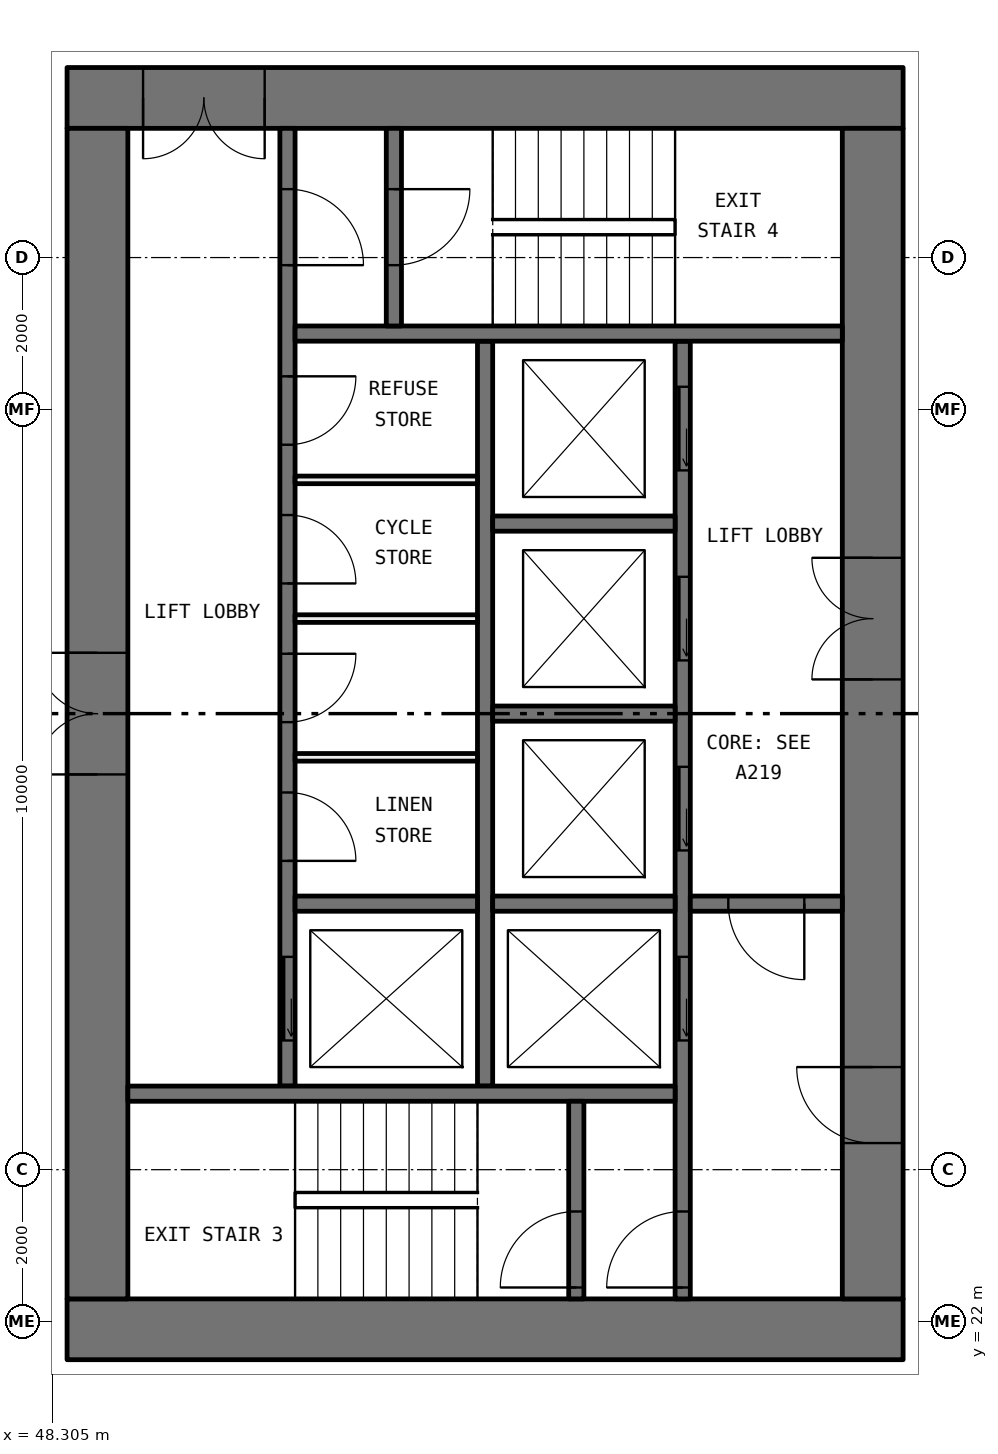
"""IFC4 building model, lengths in metres.
Left out: names, types, materials, properties, quantities, classifications, styles, units other than length and angle.
Written with IfcOpenShell. Run it as: python <this file> out.ifc"""

import sys

from ifc_helpers import new_model, si_unit, direction, frame, frame_2d, origin, place, context, subcontext, project, spatial, rectangle, extrude, element, fill, save


model = new_model("IFC4")
c1 = context("Model", 3, precision=1e-05, world=origin(), true_north=direction((0.0, 1.0)))
c2 = subcontext(c1, "Body", "Model", "MODEL_VIEW")
j1 = project(units=[si_unit("LENGTHUNIT", "METRE"), si_unit("PLANEANGLEUNIT", "RADIAN")], contexts=[c1])
p1 = place(None, origin())
s1 = spatial("IfcSite", under=j1, at=p1, CompositionType="ELEMENT")
p2 = place(p1, origin())
s2 = spatial("IfcBuilding", under=s1, at=p2, CompositionType="ELEMENT")
p3 = place(p2, frame((0.0, 0.0, 74.85)))
s3 = spatial("IfcBuildingStorey", under=s2, at=p3, CompositionType="ELEMENT", Elevation=74.85)
p4 = place(p3, frame((59.5, 21.9, 0.0), z_axis=(0.0, 0.0, 1.0), x_axis=(-1.0, 0.0, 0.0)))
e1 = element("IfcWall", 1, at=p4, inside=s3, PredefinedType="SHEAR", context=c2, shape_type="SweptSolid", body=[
    extrude(rectangle(XDim=11.0, YDim=0.8, at=frame_2d((5.5, 0.0))), origin(), (0.0, 0.0, 1.0), 3.05),
])
p5 = place(p3, frame((59.5, 38.1, 0.0), z_axis=(0.0, 0.0, 1.0), x_axis=(-1.0, 0.0, 0.0)))
e2 = element("IfcWall", 2, at=p5, inside=s3, PredefinedType="SHEAR", context=c2, shape_type="SweptSolid", body=[
    extrude(rectangle(XDim=11.0, YDim=0.8, at=frame_2d((5.5, 0.0))), origin(), (0.0, 0.0, 1.0), 3.05),
])
p6 = place(p5, frame((8.4, 0.0, 0.0)))
e3 = element("IfcOpeningElement", 3, at=p6, cuts=e2, PredefinedType="OPENING", context=c2, shape_type="SweptSolid", body=[
    extrude(rectangle(XDim=1.6, YDim=2.1, at=frame_2d((0.8, 1.05))), frame((0.0, 0.41, 0.0), z_axis=(0.0, -1.0, 0.0), x_axis=(1.0, 0.0, 0.0)), (0.0, 0.0, 1.0), 0.82),
])
p7 = place(p3, frame((59.1, 22.3, 0.0), z_axis=(0.0, 0.0, 1.0), x_axis=(0.0, 1.0, 0.0)))
e4 = element("IfcWall", 4, at=p7, inside=s3, PredefinedType="SHEAR", context=c2, shape_type="SweptSolid", body=[
    extrude(rectangle(XDim=15.4, YDim=0.8, at=frame_2d((7.7, 0.0))), origin(), (0.0, 0.0, 1.0), 3.05),
])
p8 = place(p7, frame((8.15, 0.0, 0.0)))
e5 = element("IfcOpeningElement", 5, at=p8, cuts=e4, PredefinedType="OPENING", context=c2, shape_type="SweptSolid", body=[
    extrude(rectangle(XDim=1.6, YDim=2.1, at=frame_2d((0.8, 1.05))), frame((0.0, 0.41, 0.0), z_axis=(0.0, -1.0, 0.0), x_axis=(1.0, 0.0, 0.0)), (0.0, 0.0, 1.0), 0.82),
])
p9 = place(p7, frame((2.05, 0.0, 0.0)))
e6 = element("IfcOpeningElement", 6, at=p9, cuts=e4, PredefinedType="OPENING", context=c2, shape_type="SweptSolid", body=[
    extrude(rectangle(XDim=1.0, YDim=2.1, at=frame_2d((0.5, 1.05))), frame((0.0, 0.41, 0.0), z_axis=(0.0, -1.0, 0.0), x_axis=(1.0, 0.0, 0.0)), (0.0, 0.0, 1.0), 0.82),
])
p10 = place(p3, frame((48.9, 22.3, 0.0), z_axis=(0.0, 0.0, 1.0), x_axis=(0.0, 1.0, 0.0)))
e7 = element("IfcWall", 7, at=p10, inside=s3, PredefinedType="SHEAR", context=c2, shape_type="SweptSolid", body=[
    extrude(rectangle(XDim=15.4, YDim=0.8, at=frame_2d((7.7, 0.0))), origin(), (0.0, 0.0, 1.0), 3.05),
])
p11 = place(p10, frame((6.9, 0.0, 0.0)))
e8 = element("IfcOpeningElement", 8, at=p11, cuts=e7, PredefinedType="OPENING", context=c2, shape_type="SweptSolid", body=[
    extrude(rectangle(XDim=1.6, YDim=2.1, at=frame_2d((0.8, 1.05))), frame((0.0, 0.41, 0.0), z_axis=(0.0, -1.0, 0.0), x_axis=(1.0, 0.0, 0.0)), (0.0, 0.0, 1.0), 0.82),
])
p12 = place(p3, frame((56.6, 22.3, 0.0), z_axis=(0.0, 0.0, 1.0), x_axis=(0.0, 1.0, 0.0)))
e9 = element("IfcWall", 9, at=p12, inside=s3, PredefinedType="SOLIDWALL", context=c2, shape_type="SweptSolid", body=[
    extrude(rectangle(XDim=12.6, YDim=0.2, at=frame_2d((6.3, 0.0))), origin(), (0.0, 0.0, 1.0), 3.05),
])
p13 = place(p12, frame((3.4, 0.0, 0.0)))
e10 = element("IfcOpeningElement", 10, at=p13, cuts=e9, PredefinedType="OPENING", context=c2, shape_type="SweptSolid", body=[
    extrude(rectangle(XDim=1.1, YDim=2.1, at=frame_2d((0.55, 1.05))), frame((0.0, 0.11, 0.0), z_axis=(0.0, -1.0, 0.0), x_axis=(1.0, 0.0, 0.0)), (0.0, 0.0, 1.0), 0.22),
])
p14 = place(p12, frame((5.9, 0.0, 0.0)))
e11 = element("IfcOpeningElement", 11, at=p14, cuts=e9, PredefinedType="OPENING", context=c2, shape_type="SweptSolid", body=[
    extrude(rectangle(XDim=1.1, YDim=2.1, at=frame_2d((0.55, 1.05))), frame((0.0, 0.11, 0.0), z_axis=(0.0, -1.0, 0.0), x_axis=(1.0, 0.0, 0.0)), (0.0, 0.0, 1.0), 0.22),
])
p15 = place(p12, frame((8.4, 0.0, 0.0)))
e12 = element("IfcOpeningElement", 12, at=p15, cuts=e9, PredefinedType="OPENING", context=c2, shape_type="SweptSolid", body=[
    extrude(rectangle(XDim=1.1, YDim=2.1, at=frame_2d((0.55, 1.05))), frame((0.0, 0.11, 0.0), z_axis=(0.0, -1.0, 0.0), x_axis=(1.0, 0.0, 0.0)), (0.0, 0.0, 1.0), 0.22),
])
p16 = place(p12, frame((10.9, 0.0, 0.0)))
e13 = element("IfcOpeningElement", 13, at=p16, cuts=e9, PredefinedType="OPENING", context=c2, shape_type="SweptSolid", body=[
    extrude(rectangle(XDim=1.1, YDim=2.1, at=frame_2d((0.55, 1.05))), frame((0.0, 0.11, 0.0), z_axis=(0.0, -1.0, 0.0), x_axis=(1.0, 0.0, 0.0)), (0.0, 0.0, 1.0), 0.22),
])
p17 = place(p12, frame((0.15, 0.0, 0.0)))
e14 = element("IfcOpeningElement", 14, at=p17, cuts=e9, PredefinedType="OPENING", context=c2, shape_type="SweptSolid", body=[
    extrude(rectangle(XDim=1.0, YDim=2.1, at=frame_2d((0.5, 1.05))), frame((0.0, 0.11, 0.0), z_axis=(0.0, -1.0, 0.0), x_axis=(1.0, 0.0, 0.0)), (0.0, 0.0, 1.0), 0.22),
])
p18 = place(p3, frame((51.4, 25.1, 0.0), z_axis=(0.0, 0.0, 1.0), x_axis=(0.0, 1.0, 0.0)))
e15 = element("IfcWall", 15, at=p18, inside=s3, PredefinedType="SOLIDWALL", context=c2, shape_type="SweptSolid", body=[
    extrude(rectangle(XDim=12.6, YDim=0.2, at=frame_2d((6.3, 0.0))), origin(), (0.0, 0.0, 1.0), 3.05),
])
p19 = place(p18, frame((0.6, 0.0, 0.0)))
e16 = element("IfcOpeningElement", 16, at=p19, cuts=e15, PredefinedType="OPENING", context=c2, shape_type="SweptSolid", body=[
    extrude(rectangle(XDim=1.1, YDim=2.1, at=frame_2d((0.55, 1.05))), frame((0.0, 0.11, 0.0), z_axis=(0.0, -1.0, 0.0), x_axis=(1.0, 0.0, 0.0)), (0.0, 0.0, 1.0), 0.22),
])
p20 = place(p18, frame((10.8, 0.0, 0.0)))
e17 = element("IfcOpeningElement", 17, at=p20, cuts=e15, PredefinedType="OPENING", context=c2, shape_type="SweptSolid", body=[
    extrude(rectangle(XDim=1.0, YDim=2.1, at=frame_2d((0.5, 1.05))), frame((0.0, 0.11, 0.0), z_axis=(0.0, -1.0, 0.0), x_axis=(1.0, 0.0, 0.0)), (0.0, 0.0, 1.0), 0.22),
])
p21 = place(p18, frame((2.962, 0.0, 0.0)))
e18 = element("IfcOpeningElement", 18, at=p21, cuts=e15, PredefinedType="OPENING", context=c2, shape_type="SweptSolid", body=[
    extrude(rectangle(XDim=0.9, YDim=2.1, at=frame_2d((0.45, 1.05))), frame((0.0, 0.11, 0.0), z_axis=(0.0, -1.0, 0.0), x_axis=(1.0, 0.0, 0.0)), (0.0, 0.0, 1.0), 0.22),
])
p22 = place(p18, frame((4.788, 0.0, 0.0)))
e19 = element("IfcOpeningElement", 19, at=p22, cuts=e15, PredefinedType="OPENING", context=c2, shape_type="SweptSolid", body=[
    extrude(rectangle(XDim=0.9, YDim=2.1, at=frame_2d((0.45, 1.05))), frame((0.0, 0.11, 0.0), z_axis=(0.0, -1.0, 0.0), x_axis=(1.0, 0.0, 0.0)), (0.0, 0.0, 1.0), 0.22),
])
p23 = place(p18, frame((6.613, 0.0, 0.0)))
e20 = element("IfcOpeningElement", 20, at=p23, cuts=e15, PredefinedType="OPENING", context=c2, shape_type="SweptSolid", body=[
    extrude(rectangle(XDim=0.9, YDim=2.1, at=frame_2d((0.45, 1.05))), frame((0.0, 0.11, 0.0), z_axis=(0.0, -1.0, 0.0), x_axis=(1.0, 0.0, 0.0)), (0.0, 0.0, 1.0), 0.22),
])
p24 = place(p18, frame((8.438, 0.0, 0.0)))
e21 = element("IfcOpeningElement", 21, at=p24, cuts=e15, PredefinedType="OPENING", context=c2, shape_type="SweptSolid", body=[
    extrude(rectangle(XDim=0.9, YDim=2.1, at=frame_2d((0.45, 1.05))), frame((0.0, 0.11, 0.0), z_axis=(0.0, -1.0, 0.0), x_axis=(1.0, 0.0, 0.0)), (0.0, 0.0, 1.0), 0.22),
])
p25 = place(p3, frame((54.0, 25.1, 0.0), z_axis=(0.0, 0.0, 1.0), x_axis=(0.0, 1.0, 0.0)))
e22 = element("IfcWall", 22, at=p25, inside=s3, PredefinedType="SOLIDWALL", context=c2, shape_type="SweptSolid", body=[
    extrude(rectangle(XDim=9.8, YDim=0.2, at=frame_2d((4.9, 0.0))), origin(), (0.0, 0.0, 1.0), 3.05),
])
for number, where, z_axis, x_axis in (
    (23, (56.5, 25.0, 0.0), (0.0, 0.0, 1.0), (-1.0, 0.0, 0.0)),
    (24, (58.7, 35.0, 0.0), (0.0, 0.0, 1.0), (-1.0, 0.0, 0.0)),
):
    element("IfcWall", number, at=place(p3, frame(where, z_axis=z_axis, x_axis=x_axis)), inside=s3, PredefinedType="SOLIDWALL", context=c2, shape_type="SweptSolid", body=[
        extrude(rectangle(XDim=7.2, YDim=0.2, at=frame_2d((3.6, 0.0))), origin(), (0.0, 0.0, 1.0), 3.05),
    ])
p26 = place(p3, frame((58.7, 27.5, 0.0), z_axis=(0.0, 0.0, 1.0), x_axis=(-1.0, 0.0, 0.0)))
e25 = element("IfcWall", 25, at=p26, inside=s3, PredefinedType="SOLIDWALL", context=c2, shape_type="SweptSolid", body=[
    extrude(rectangle(XDim=2.0, YDim=0.2, at=frame_2d((1.0, 0.0))), origin(), (0.0, 0.0, 1.0), 3.05),
])
p27 = place(p26, frame((0.5, 0.0, 0.0)))
e26 = element("IfcOpeningElement", 26, at=p27, cuts=e25, PredefinedType="OPENING", context=c2, shape_type="SweptSolid", body=[
    extrude(rectangle(XDim=1.0, YDim=2.1, at=frame_2d((0.5, 1.05))), frame((0.0, 0.11, 0.0), z_axis=(0.0, -1.0, 0.0), x_axis=(1.0, 0.0, 0.0)), (0.0, 0.0, 1.0), 0.22),
])
p28 = place(p3, frame((55.2, 22.3, 0.0), z_axis=(0.0, 0.0, 1.0), x_axis=(0.0, 1.0, 0.0)))
e27 = element("IfcWall", 27, at=p28, inside=s3, PredefinedType="SOLIDWALL", context=c2, shape_type="SweptSolid", body=[
    extrude(rectangle(XDim=2.6, YDim=0.2, at=frame_2d((1.3, 0.0))), origin(), (0.0, 0.0, 1.0), 3.05),
])
p29 = place(p28, frame((0.15, 0.0, 0.0)))
e28 = element("IfcOpeningElement", 28, at=p29, cuts=e27, PredefinedType="OPENING", context=c2, shape_type="SweptSolid", body=[
    extrude(rectangle(XDim=1.0, YDim=2.1, at=frame_2d((0.5, 1.05))), frame((0.0, 0.11, 0.0), z_axis=(0.0, -1.0, 0.0), x_axis=(1.0, 0.0, 0.0)), (0.0, 0.0, 1.0), 0.22),
])
p30 = place(p3, frame((52.8, 35.1, 0.0), z_axis=(0.0, 0.0, 1.0), x_axis=(0.0, 1.0, 0.0)))
e29 = element("IfcWall", 29, at=p30, inside=s3, PredefinedType="SOLIDWALL", context=c2, shape_type="SweptSolid", body=[
    extrude(rectangle(XDim=2.6, YDim=0.2, at=frame_2d((1.3, 0.0))), origin(), (0.0, 0.0, 1.0), 3.05),
])
p31 = place(p30, frame((0.8, 0.0, 0.0)))
e30 = element("IfcOpeningElement", 30, at=p31, cuts=e29, PredefinedType="OPENING", context=c2, shape_type="SweptSolid", body=[
    extrude(rectangle(XDim=1.0, YDim=2.1, at=frame_2d((0.5, 1.05))), frame((0.0, 0.11, 0.0), z_axis=(0.0, -1.0, 0.0), x_axis=(1.0, 0.0, 0.0)), (0.0, 0.0, 1.0), 0.22),
])
for number, where, z_axis, x_axis in (
    (31, (56.5, 27.5, 0.0), (0.0, 0.0, 1.0), (-1.0, 0.0, 0.0)),
    (32, (56.5, 30.0, 0.0), (0.0, 0.0, 1.0), (-1.0, 0.0, 0.0)),
    (33, (56.5, 32.5, 0.0), (0.0, 0.0, 1.0), (-1.0, 0.0, 0.0)),
    (34, (53.9, 27.5, 0.0), (0.0, 0.0, 1.0), (-1.0, 0.0, 0.0)),
):
    element("IfcWall", number, at=place(p3, frame(where, z_axis=z_axis, x_axis=x_axis)), inside=s3, PredefinedType="SOLIDWALL", context=c2, shape_type="SweptSolid", body=[
        extrude(rectangle(XDim=2.4, YDim=0.2, at=frame_2d((1.2, 0.0))), origin(), (0.0, 0.0, 1.0), 3.05),
    ])
for number, where, z_axis, x_axis in (
    (35, (53.9, 29.425, 0.0), (0.0, 0.0, 1.0), (-1.0, 0.0, 0.0)),
    (36, (53.9, 31.25, 0.0), (0.0, 0.0, 1.0), (-1.0, 0.0, 0.0)),
    (37, (53.9, 33.075, 0.0), (0.0, 0.0, 1.0), (-1.0, 0.0, 0.0)),
):
    element("IfcWall", number, at=place(p3, frame(where, z_axis=z_axis, x_axis=x_axis)), inside=s3, PredefinedType="PARTITIONING", context=c2, shape_type="SweptSolid", body=[
        extrude(rectangle(XDim=2.4, YDim=0.1, at=frame_2d((1.2, 0.0))), origin(), (0.0, 0.0, 1.0), 3.05),
    ])
p32 = place(p19, origin())
e38 = element("IfcDoor", 38, at=p32, inside=s3, OperationType="SLIDING_TO_LEFT", PredefinedType="DOOR", context=c2, shape_type="SweptSolid", body=[
    extrude(rectangle(XDim=1.1, YDim=2.1, at=frame_2d((0.55, 1.05))), frame((0.0, 0.025, 0.0), z_axis=(0.0, -1.0, 0.0), x_axis=(1.0, 0.0, 0.0)), (0.0, 0.0, 1.0), 0.05),
])
fill(e16, e38)
p33 = place(p13, origin())
e39 = element("IfcDoor", 39, at=p33, inside=s3, OperationType="SLIDING_TO_LEFT", PredefinedType="DOOR", context=c2, shape_type="SweptSolid", body=[
    extrude(rectangle(XDim=1.1, YDim=2.1, at=frame_2d((0.55, 1.05))), frame((0.0, 0.025, 0.0), z_axis=(0.0, -1.0, 0.0), x_axis=(1.0, 0.0, 0.0)), (0.0, 0.0, 1.0), 0.05),
])
fill(e10, e39)
p34 = place(p14, origin())
e40 = element("IfcDoor", 40, at=p34, inside=s3, OperationType="SLIDING_TO_LEFT", PredefinedType="DOOR", context=c2, shape_type="SweptSolid", body=[
    extrude(rectangle(XDim=1.1, YDim=2.1, at=frame_2d((0.55, 1.05))), frame((0.0, 0.025, 0.0), z_axis=(0.0, -1.0, 0.0), x_axis=(1.0, 0.0, 0.0)), (0.0, 0.0, 1.0), 0.05),
])
fill(e11, e40)
p35 = place(p15, origin())
e41 = element("IfcDoor", 41, at=p35, inside=s3, OperationType="SLIDING_TO_LEFT", PredefinedType="DOOR", context=c2, shape_type="SweptSolid", body=[
    extrude(rectangle(XDim=1.1, YDim=2.1, at=frame_2d((0.55, 1.05))), frame((0.0, 0.025, 0.0), z_axis=(0.0, -1.0, 0.0), x_axis=(1.0, 0.0, 0.0)), (0.0, 0.0, 1.0), 0.05),
])
fill(e12, e41)
p36 = place(p16, origin())
e42 = element("IfcDoor", 42, at=p36, inside=s3, OperationType="SLIDING_TO_LEFT", PredefinedType="DOOR", context=c2, shape_type="SweptSolid", body=[
    extrude(rectangle(XDim=1.1, YDim=2.1, at=frame_2d((0.55, 1.05))), frame((0.0, 0.025, 0.0), z_axis=(0.0, -1.0, 0.0), x_axis=(1.0, 0.0, 0.0)), (0.0, 0.0, 1.0), 0.05),
])
fill(e13, e42)
p37 = place(p29, origin())
e43 = element("IfcDoor", 43, at=p37, inside=s3, OperationType="SINGLE_SWING_RIGHT", PredefinedType="DOOR", context=c2, shape_type="SweptSolid", body=[
    extrude(rectangle(XDim=1.0, YDim=2.1, at=frame_2d((0.5, 1.05))), frame((0.0, 0.025, 0.0), z_axis=(0.0, -1.0, 0.0), x_axis=(1.0, 0.0, 0.0)), (0.0, 0.0, 1.0), 0.05),
])
fill(e28, e43)
p38 = place(p17, origin())
e44 = element("IfcDoor", 44, at=p38, inside=s3, OperationType="SINGLE_SWING_RIGHT", PredefinedType="DOOR", context=c2, shape_type="SweptSolid", body=[
    extrude(rectangle(XDim=1.0, YDim=2.1, at=frame_2d((0.5, 1.05))), frame((0.0, 0.025, 0.0), z_axis=(0.0, -1.0, 0.0), x_axis=(1.0, 0.0, 0.0)), (0.0, 0.0, 1.0), 0.05),
])
fill(e14, e44)
p39 = place(p20, frame((1.0, 0.0, 0.0), x_axis=(-1.0, 0.0, 0.0)))
e45 = element("IfcDoor", 45, at=p39, inside=s3, OperationType="SINGLE_SWING_LEFT", PredefinedType="DOOR", context=c2, shape_type="SweptSolid", body=[
    extrude(rectangle(XDim=1.0, YDim=2.1, at=frame_2d((0.5, 1.05))), frame((0.0, 0.025, 0.0), z_axis=(0.0, -1.0, 0.0), x_axis=(1.0, 0.0, 0.0)), (0.0, 0.0, 1.0), 0.05),
])
fill(e17, e45)
p40 = place(p31, frame((1.0, 0.0, 0.0), x_axis=(-1.0, 0.0, 0.0)))
e46 = element("IfcDoor", 46, at=p40, inside=s3, OperationType="SINGLE_SWING_RIGHT", PredefinedType="DOOR", context=c2, shape_type="SweptSolid", body=[
    extrude(rectangle(XDim=1.0, YDim=2.1, at=frame_2d((0.5, 1.05))), frame((0.0, 0.025, 0.0), z_axis=(0.0, -1.0, 0.0), x_axis=(1.0, 0.0, 0.0)), (0.0, 0.0, 1.0), 0.05),
])
fill(e30, e46)
p41 = place(p27, origin())
e47 = element("IfcDoor", 47, at=p41, inside=s3, OperationType="SINGLE_SWING_RIGHT", PredefinedType="DOOR", context=c2, shape_type="SweptSolid", body=[
    extrude(rectangle(XDim=1.0, YDim=2.1, at=frame_2d((0.5, 1.05))), frame((0.0, 0.025, 0.0), z_axis=(0.0, -1.0, 0.0), x_axis=(1.0, 0.0, 0.0)), (0.0, 0.0, 1.0), 0.05),
])
fill(e26, e47)
p42 = place(p8, origin())
e48 = element("IfcDoor", 48, at=p42, inside=s3, OperationType="DOUBLE_DOOR_SINGLE_SWING", PredefinedType="DOOR", context=c2, shape_type="SweptSolid", body=[
    extrude(rectangle(XDim=1.6, YDim=2.1, at=frame_2d((0.8, 1.05))), frame((0.0, 0.025, 0.0), z_axis=(0.0, -1.0, 0.0), x_axis=(1.0, 0.0, 0.0)), (0.0, 0.0, 1.0), 0.05),
])
fill(e5, e48)
p43 = place(p9, origin())
e49 = element("IfcDoor", 49, at=p43, inside=s3, OperationType="SINGLE_SWING_LEFT", PredefinedType="DOOR", context=c2, shape_type="SweptSolid", body=[
    extrude(rectangle(XDim=1.0, YDim=2.1, at=frame_2d((0.5, 1.05))), frame((0.0, 0.025, 0.0), z_axis=(0.0, -1.0, 0.0), x_axis=(1.0, 0.0, 0.0)), (0.0, 0.0, 1.0), 0.05),
])
fill(e6, e49)
p44 = place(p6, origin())
e50 = element("IfcDoor", 50, at=p44, inside=s3, OperationType="DOUBLE_DOOR_SINGLE_SWING", PredefinedType="DOOR", context=c2, shape_type="SweptSolid", body=[
    extrude(rectangle(XDim=1.6, YDim=2.1, at=frame_2d((0.8, 1.05))), frame((0.0, 0.025, 0.0), z_axis=(0.0, -1.0, 0.0), x_axis=(1.0, 0.0, 0.0)), (0.0, 0.0, 1.0), 0.05),
])
fill(e3, e50)
p45 = place(p11, origin())
e51 = element("IfcDoor", 51, at=p45, inside=s3, OperationType="DOUBLE_DOOR_SINGLE_SWING", PredefinedType="DOOR", context=c2, shape_type="SweptSolid", body=[
    extrude(rectangle(XDim=1.6, YDim=2.1, at=frame_2d((0.8, 1.05))), frame((0.0, 0.025, 0.0), z_axis=(0.0, -1.0, 0.0), x_axis=(1.0, 0.0, 0.0)), (0.0, 0.0, 1.0), 0.05),
])
fill(e8, e51)
p46 = place(p21, frame((0.9, 0.0, 0.0), x_axis=(-1.0, 0.0, 0.0)))
e52 = element("IfcDoor", 52, at=p46, inside=s3, OperationType="SINGLE_SWING_LEFT", PredefinedType="DOOR", context=c2, shape_type="SweptSolid", body=[
    extrude(rectangle(XDim=0.9, YDim=2.1, at=frame_2d((0.45, 1.05))), frame((0.0, 0.025, 0.0), z_axis=(0.0, -1.0, 0.0), x_axis=(1.0, 0.0, 0.0)), (0.0, 0.0, 1.0), 0.05),
])
fill(e18, e52)
p47 = place(p22, frame((0.9, 0.0, 0.0), x_axis=(-1.0, 0.0, 0.0)))
e53 = element("IfcDoor", 53, at=p47, inside=s3, OperationType="SINGLE_SWING_RIGHT", PredefinedType="DOOR", context=c2, shape_type="SweptSolid", body=[
    extrude(rectangle(XDim=0.9, YDim=2.1, at=frame_2d((0.45, 1.05))), frame((0.0, 0.025, 0.0), z_axis=(0.0, -1.0, 0.0), x_axis=(1.0, 0.0, 0.0)), (0.0, 0.0, 1.0), 0.05),
])
fill(e19, e53)
p48 = place(p23, frame((0.9, 0.0, 0.0), x_axis=(-1.0, 0.0, 0.0)))
e54 = element("IfcDoor", 54, at=p48, inside=s3, OperationType="SINGLE_SWING_LEFT", PredefinedType="DOOR", context=c2, shape_type="SweptSolid", body=[
    extrude(rectangle(XDim=0.9, YDim=2.1, at=frame_2d((0.45, 1.05))), frame((0.0, 0.025, 0.0), z_axis=(0.0, -1.0, 0.0), x_axis=(1.0, 0.0, 0.0)), (0.0, 0.0, 1.0), 0.05),
])
fill(e20, e54)
p49 = place(p24, frame((0.9, 0.0, 0.0), x_axis=(-1.0, 0.0, 0.0)))
e55 = element("IfcDoor", 55, at=p49, inside=s3, OperationType="SINGLE_SWING_RIGHT", PredefinedType="DOOR", context=c2, shape_type="SweptSolid", body=[
    extrude(rectangle(XDim=0.9, YDim=2.1, at=frame_2d((0.45, 1.05))), frame((0.0, 0.025, 0.0), z_axis=(0.0, -1.0, 0.0), x_axis=(1.0, 0.0, 0.0)), (0.0, 0.0, 1.0), 0.05),
])
fill(e21, e55)
save(model, sys.argv[1])
